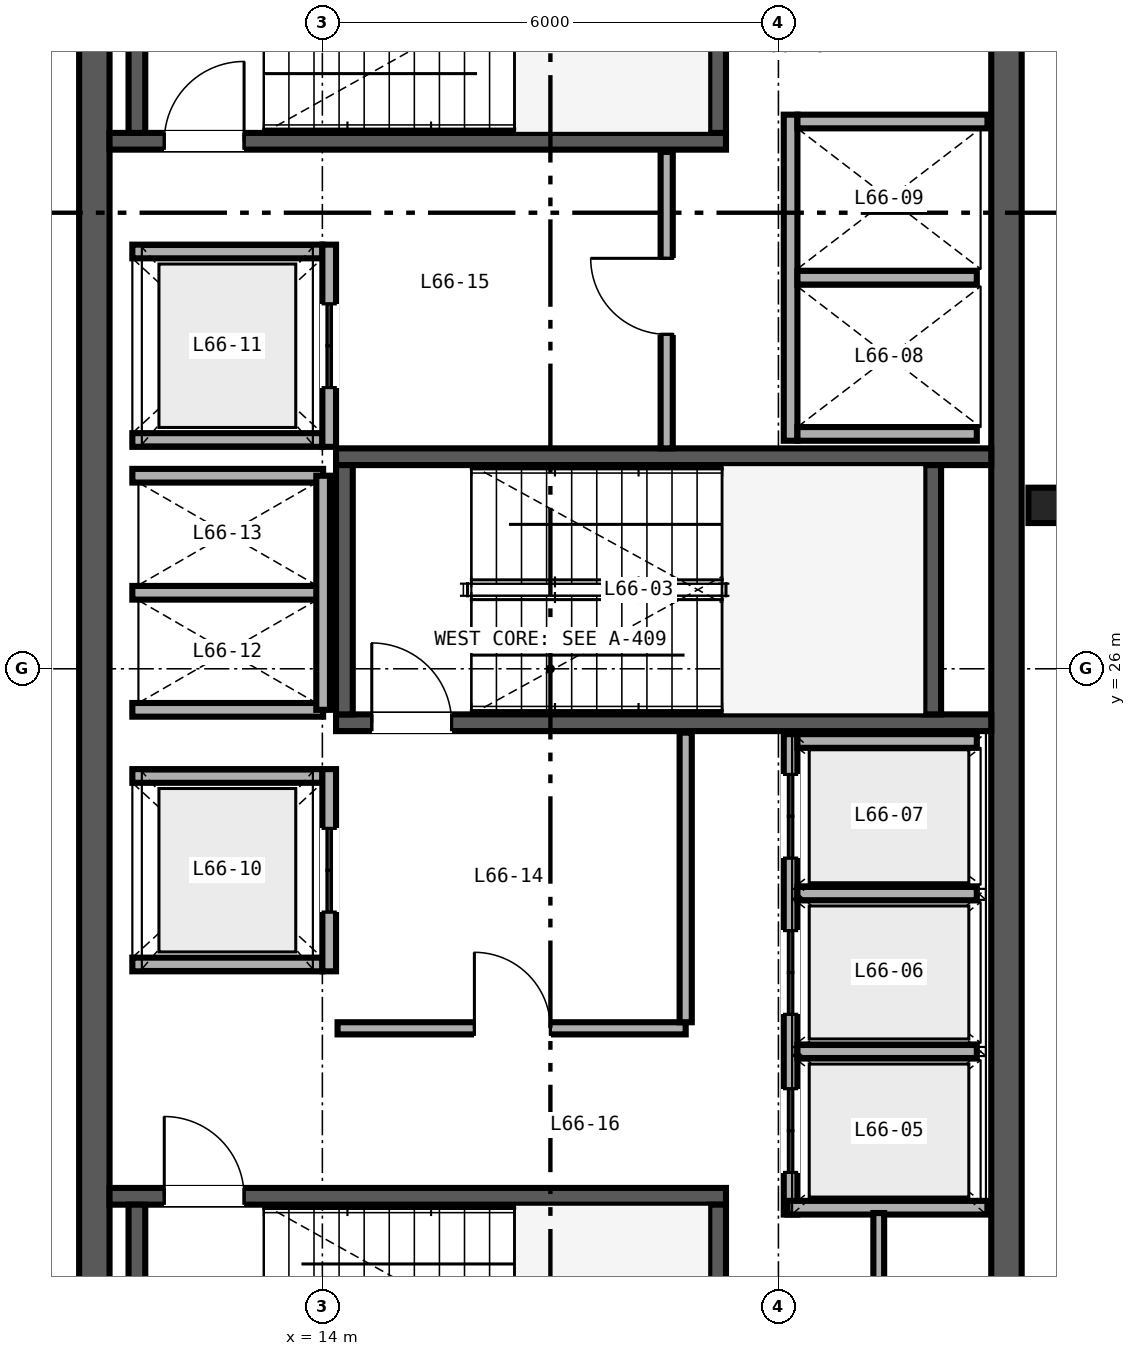
"""IFC4 building model, lengths in metres.
Left out: names, types, materials, properties, quantities, classifications, styles, units other than length and angle.
Written with IfcOpenShell. Run it as: python <this file> out.ifc"""

import sys

from ifc_helpers import new_model, si_unit, direction, frame, frame_2d, origin, origin_2d, place, context, subcontext, project, spatial, rectangle, i_section, extrude, source, transform, mapped, element, fill, save


model = new_model("IFC4")
c1 = context("Model", 3, precision=1e-05, world=origin(), true_north=direction((0.0, 1.0)))
c2 = subcontext(c1, "Body", "Model", "MODEL_VIEW")
j1 = project(units=[si_unit("LENGTHUNIT", "METRE"), si_unit("PLANEANGLEUNIT", "RADIAN")], contexts=[c1])
p1 = place(None, origin())
s1 = spatial("IfcSite", under=j1, at=p1, CompositionType="ELEMENT")
p2 = place(p1, origin())
s2 = spatial("IfcBuilding", under=s1, at=p2, CompositionType="ELEMENT")
p3 = place(p2, frame((0.0, 0.0, 261.6)))
s3 = spatial("IfcBuildingStorey", under=s2, at=p3, CompositionType="ELEMENT", Elevation=261.6)
for number, where, z_axis, x_axis in (
    (1, (11.0, 15.2, 0.0), (0.0, 0.0, 1.0), (0.0, 1.0, 0.0)),
    (2, (23.0, 15.2, 0.0), (0.0, 0.0, 1.0), (0.0, 1.0, 0.0)),
):
    element("IfcWall", number, at=place(p3, frame(where, z_axis=z_axis, x_axis=x_axis)), inside=s3, PredefinedType="SHEAR", context=c2, shape_type="SweptSolid", body=[
        extrude(rectangle(XDim=21.6, YDim=0.4, at=frame_2d((10.8, 0.0))), origin(), (0.0, 0.0, 1.0), 3.38),
    ])
p4 = place(p3, frame((11.2, 19.06, 0.0), z_axis=(0.0, 0.0, 1.0), x_axis=(1.0, 0.0, 0.0)))
e3 = element("IfcWall", 3, at=p4, inside=s3, PredefinedType="SHEAR", context=c2, shape_type="SweptSolid", body=[
    extrude(rectangle(XDim=8.11, YDim=0.22, at=frame_2d((4.055, 0.0))), origin(), (0.0, 0.0, 1.0), 3.4),
])
p5 = place(p4, frame((0.72, 0.0, 0.0)))
e4 = element("IfcOpeningElement", 4, at=p5, cuts=e3, PredefinedType="OPENING", context=c2, shape_type="SweptSolid", body=[
    extrude(rectangle(XDim=1.05, YDim=2.15, at=frame_2d((0.525, 1.075))), frame((0.0, 0.12, 0.0), z_axis=(0.0, -1.0, 0.0), x_axis=(1.0, 0.0, 0.0)), (0.0, 0.0, 1.0), 0.24),
])
for number, where, z_axis, x_axis in (
    (5, (11.56, 15.67, 0.0), (0.0, 0.0, 1.0), (0.0, 1.0, 0.0)),
    (6, (19.2, 15.67, 0.0), (0.0, 0.0, 1.0), (0.0, 1.0, 0.0)),
):
    element("IfcWall", number, at=place(p3, frame(where, z_axis=z_axis, x_axis=x_axis)), inside=s3, PredefinedType="SHEAR", context=c2, shape_type="SweptSolid", body=[
        extrude(rectangle(XDim=3.28, YDim=0.22, at=frame_2d((1.64, 0.0))), origin(), (0.0, 0.0, 1.0), 3.4),
    ])
p6 = place(p3, frame((11.2, 32.94, 0.0), z_axis=(0.0, 0.0, 1.0), x_axis=(1.0, 0.0, 0.0)))
e7 = element("IfcWall", 7, at=p6, inside=s3, PredefinedType="SHEAR", context=c2, shape_type="SweptSolid", body=[
    extrude(rectangle(XDim=8.11, YDim=0.22, at=frame_2d((4.055, 0.0))), origin(), (0.0, 0.0, 1.0), 3.4),
])
p7 = place(p6, frame((0.72, 0.0, 0.0)))
e8 = element("IfcOpeningElement", 8, at=p7, cuts=e7, PredefinedType="OPENING", context=c2, shape_type="SweptSolid", body=[
    extrude(rectangle(XDim=1.05, YDim=2.15, at=frame_2d((0.525, 1.075))), frame((0.0, 0.12, 0.0), z_axis=(0.0, -1.0, 0.0), x_axis=(1.0, 0.0, 0.0)), (0.0, 0.0, 1.0), 0.24),
])
for number, where, z_axis, x_axis in (
    (9, (11.56, 33.05, 0.0), (0.0, 0.0, 1.0), (0.0, 1.0, 0.0)),
    (10, (19.2, 33.05, 0.0), (0.0, 0.0, 1.0), (0.0, 1.0, 0.0)),
):
    element("IfcWall", number, at=place(p3, frame(where, z_axis=z_axis, x_axis=x_axis)), inside=s3, PredefinedType="SHEAR", context=c2, shape_type="SweptSolid", body=[
        extrude(rectangle(XDim=3.28, YDim=0.22, at=frame_2d((1.64, 0.0))), origin(), (0.0, 0.0, 1.0), 3.4),
    ])
p8 = place(p3, frame((14.18, 25.29, 0.0), z_axis=(0.0, 0.0, 1.0), x_axis=(1.0, 0.0, 0.0)))
e11 = element("IfcWall", 11, at=p8, inside=s3, PredefinedType="SHEAR", context=c2, shape_type="SweptSolid", body=[
    extrude(rectangle(XDim=8.62, YDim=0.22, at=frame_2d((4.31, 0.0))), origin(), (0.0, 0.0, 1.0), 3.4),
])
p9 = place(p8, frame((0.47, 0.0, 0.0)))
e12 = element("IfcOpeningElement", 12, at=p9, cuts=e11, PredefinedType="OPENING", context=c2, shape_type="SweptSolid", body=[
    extrude(rectangle(XDim=1.05, YDim=2.15, at=frame_2d((0.525, 1.075))), frame((0.0, 0.12, 0.0), z_axis=(0.0, -1.0, 0.0), x_axis=(1.0, 0.0, 0.0)), (0.0, 0.0, 1.0), 0.24),
])
p10 = place(p3, frame((14.18, 28.79, 0.0), z_axis=(0.0, 0.0, 1.0), x_axis=(1.0, 0.0, 0.0)))
e13 = element("IfcWall", 13, at=p10, inside=s3, PredefinedType="SHEAR", context=c2, shape_type="SweptSolid", body=[
    extrude(rectangle(XDim=8.62, YDim=0.22, at=frame_2d((4.31, 0.0))), origin(), (0.0, 0.0, 1.0), 3.4),
])
for number, where, z_axis, x_axis in (
    (14, (14.29, 25.4, 0.0), (0.0, 0.0, 1.0), (0.0, 1.0, 0.0)),
    (15, (22.03, 25.4, 0.0), (0.0, 0.0, 1.0), (0.0, 1.0, 0.0)),
):
    element("IfcWall", number, at=place(p3, frame(where, z_axis=z_axis, x_axis=x_axis)), inside=s3, PredefinedType="SHEAR", context=c2, shape_type="SweptSolid", body=[
        extrude(rectangle(XDim=3.28, YDim=0.22, at=frame_2d((1.64, 0.0))), origin(), (0.0, 0.0, 1.0), 3.4),
    ])
m1 = source(origin(), c2, "Body", "SweptSolid", [
    extrude(i_section(OverallWidth=0.422, OverallDepth=0.465, WebThickness=0.045, FlangeThickness=0.073, FilletRadius=0.025, at=origin_2d()), origin(), (0.0, 0.0, 1.0), 3.38),
])
p11 = place(p3, frame((23.5, 28.15, 0.0), z_axis=(0.0, 0.0, 1.0), x_axis=(1.0, 0.0, 0.0)))
e16 = element("IfcColumn", 16, at=p11, inside=s3, PredefinedType="COLUMN", context=c2, shape_type="MappedRepresentation", body=[
    mapped(m1, transform((0.0, 0.0, 0.0), scale=1.0)),
])
p12 = place(p3, frame((20.16, 18.82, 0.0), z_axis=(0.0, 0.0, 1.0), x_axis=(0.0, 1.0, 0.0)))
e17 = element("IfcWall", 17, at=p12, inside=s3, PredefinedType="SOLIDWALL", context=c2, shape_type="SweptSolid", body=[
    extrude(rectangle(XDim=6.32, YDim=0.18, at=frame_2d((3.16, 0.0))), origin(), (0.0, 0.0, 1.0), 2.48),
])
p13 = place(p12, frame((0.555, 0.0, 0.0)))
e18 = element("IfcOpeningElement", 18, at=p13, cuts=e17, PredefinedType="OPENING", context=c2, shape_type="SweptSolid", body=[
    extrude(rectangle(XDim=1.1, YDim=2.2, at=frame_2d((0.55, 1.1))), frame((0.0, 0.1, 0.0), z_axis=(0.0, -1.0, 0.0), x_axis=(1.0, 0.0, 0.0)), (0.0, 0.0, 1.0), 0.2),
])
p14 = place(p12, frame((2.635, 0.0, 0.0)))
e19 = element("IfcOpeningElement", 19, at=p14, cuts=e17, PredefinedType="OPENING", context=c2, shape_type="SweptSolid", body=[
    extrude(rectangle(XDim=1.1, YDim=2.2, at=frame_2d((0.55, 1.1))), frame((0.0, 0.1, 0.0), z_axis=(0.0, -1.0, 0.0), x_axis=(1.0, 0.0, 0.0)), (0.0, 0.0, 1.0), 0.2),
])
p15 = place(p12, frame((4.69, 0.0, 0.0)))
e20 = element("IfcOpeningElement", 20, at=p15, cuts=e17, PredefinedType="OPENING", context=c2, shape_type="SweptSolid", body=[
    extrude(rectangle(XDim=1.1, YDim=2.2, at=frame_2d((0.55, 1.1))), frame((0.0, 0.1, 0.0), z_axis=(0.0, -1.0, 0.0), x_axis=(1.0, 0.0, 0.0)), (0.0, 0.0, 1.0), 0.2),
])
p16 = place(p3, frame((20.12, 18.91, 0.0), z_axis=(0.0, 0.0, 1.0), x_axis=(1.0, 0.0, 0.0)))
e21 = element("IfcWall", 21, at=p16, inside=s3, PredefinedType="SOLIDWALL", context=c2, shape_type="SweptSolid", body=[
    extrude(rectangle(XDim=2.63, YDim=0.18, at=frame_2d((1.315, 0.0))), origin(), (0.0, 0.0, 1.0), 3.38),
])
p17 = place(p3, frame((20.25, 25.05, 0.0), z_axis=(0.0, 0.0, 1.0), x_axis=(1.0, 0.0, 0.0)))
e22 = element("IfcWall", 22, at=p17, inside=s3, PredefinedType="SOLIDWALL", context=c2, shape_type="SweptSolid", body=[
    extrude(rectangle(XDim=2.36, YDim=0.18, at=frame_2d((1.18, 0.0))), origin(), (0.0, 0.0, 1.0), 3.38),
])
p18 = place(p3, frame((20.25, 20.965, 0.0), z_axis=(0.0, 0.0, 1.0), x_axis=(1.0, 0.0, 0.0)))
e23 = element("IfcWall", 23, at=p18, inside=s3, PredefinedType="SOLIDWALL", context=c2, shape_type="SweptSolid", body=[
    extrude(rectangle(XDim=2.36, YDim=0.18, at=frame_2d((1.18, 0.0))), origin(), (0.0, 0.0, 1.0), 2.48),
])
p19 = place(p3, frame((20.25, 23.045, 0.0), z_axis=(0.0, 0.0, 1.0), x_axis=(1.0, 0.0, 0.0)))
e24 = element("IfcWall", 24, at=p19, inside=s3, PredefinedType="SOLIDWALL", context=c2, shape_type="SweptSolid", body=[
    extrude(rectangle(XDim=2.36, YDim=0.18, at=frame_2d((1.18, 0.0))), origin(), (0.0, 0.0, 1.0), 3.38),
])
p20 = place(p3, frame((20.16, 29.0, 0.0), z_axis=(0.0, 0.0, 1.0), x_axis=(0.0, 1.0, 0.0)))
e25 = element("IfcWall", 25, at=p20, inside=s3, PredefinedType="SOLIDWALL", context=c2, shape_type="SweptSolid", body=[
    extrude(rectangle(XDim=4.29, YDim=0.18, at=frame_2d((2.145, 0.0))), origin(), (0.0, 0.0, 1.0), 3.38),
])
p21 = place(p3, frame((20.25, 29.09, 0.0), z_axis=(0.0, 0.0, 1.0), x_axis=(1.0, 0.0, 0.0)))
e26 = element("IfcWall", 26, at=p21, inside=s3, PredefinedType="SOLIDWALL", context=c2, shape_type="SweptSolid", body=[
    extrude(rectangle(XDim=2.36, YDim=0.18, at=frame_2d((1.18, 0.0))), origin(), (0.0, 0.0, 1.0), 3.38),
])
p22 = place(p3, frame((20.25, 33.2, 0.0), z_axis=(0.0, 0.0, 1.0), x_axis=(1.0, 0.0, 0.0)))
e27 = element("IfcWall", 27, at=p22, inside=s3, PredefinedType="SOLIDWALL", context=c2, shape_type="SweptSolid", body=[
    extrude(rectangle(XDim=2.5, YDim=0.18, at=frame_2d((1.25, 0.0))), origin(), (0.0, 0.0, 1.0), 3.38),
])
p23 = place(p3, frame((20.25, 31.145, 0.0), z_axis=(0.0, 0.0, 1.0), x_axis=(1.0, 0.0, 0.0)))
e28 = element("IfcWall", 28, at=p23, inside=s3, PredefinedType="SOLIDWALL", context=c2, shape_type="SweptSolid", body=[
    extrude(rectangle(XDim=2.36, YDim=0.18, at=frame_2d((1.18, 0.0))), origin(), (0.0, 0.0, 1.0), 3.38),
])
for number, where, z_axis, x_axis in (
    (29, (11.5, 22.11, 0.0), (0.0, 0.0, 1.0), (1.0, 0.0, 0.0)),
    (30, (11.5, 24.59, 0.0), (0.0, 0.0, 1.0), (1.0, 0.0, 0.0)),
):
    element("IfcWall", number, at=place(p3, frame(where, z_axis=z_axis, x_axis=x_axis)), inside=s3, PredefinedType="SOLIDWALL", context=c2, shape_type="SweptSolid", body=[
        extrude(rectangle(XDim=2.5, YDim=0.18, at=frame_2d((1.25, 0.0))), origin(), (0.0, 0.0, 1.0), 3.38),
    ])
p24 = place(p3, frame((14.09, 22.02, 0.0), z_axis=(0.0, 0.0, 1.0), x_axis=(0.0, 1.0, 0.0)))
e31 = element("IfcWall", 31, at=p24, inside=s3, PredefinedType="SOLIDWALL", context=c2, shape_type="SweptSolid", body=[
    extrude(rectangle(XDim=2.66, YDim=0.18, at=frame_2d((1.33, 0.0))), origin(), (0.0, 0.0, 1.0), 3.38),
])
p25 = place(p24, frame((0.78, 0.0, 0.0)))
e32 = element("IfcOpeningElement", 32, at=p25, cuts=e31, PredefinedType="OPENING", context=c2, shape_type="SweptSolid", body=[
    extrude(rectangle(XDim=1.1, YDim=2.2, at=frame_2d((0.55, 1.1))), frame((0.0, 0.1, 0.0), z_axis=(0.0, -1.0, 0.0), x_axis=(1.0, 0.0, 0.0)), (0.0, 0.0, 1.0), 0.2),
])
for number, where, z_axis, x_axis in (
    (33, (11.5, 29.01, 0.0), (0.0, 0.0, 1.0), (1.0, 0.0, 0.0)),
    (34, (11.5, 31.49, 0.0), (0.0, 0.0, 1.0), (1.0, 0.0, 0.0)),
):
    element("IfcWall", number, at=place(p3, frame(where, z_axis=z_axis, x_axis=x_axis)), inside=s3, PredefinedType="SOLIDWALL", context=c2, shape_type="SweptSolid", body=[
        extrude(rectangle(XDim=2.5, YDim=0.18, at=frame_2d((1.25, 0.0))), origin(), (0.0, 0.0, 1.0), 3.38),
    ])
p26 = place(p3, frame((14.09, 28.92, 0.0), z_axis=(0.0, 0.0, 1.0), x_axis=(0.0, 1.0, 0.0)))
e35 = element("IfcWall", 35, at=p26, inside=s3, PredefinedType="SOLIDWALL", context=c2, shape_type="SweptSolid", body=[
    extrude(rectangle(XDim=2.66, YDim=0.18, at=frame_2d((1.33, 0.0))), origin(), (0.0, 0.0, 1.0), 3.38),
])
p27 = place(p26, frame((0.78, 0.0, 0.0)))
e36 = element("IfcOpeningElement", 36, at=p27, cuts=e35, PredefinedType="OPENING", context=c2, shape_type="SweptSolid", body=[
    extrude(rectangle(XDim=1.1, YDim=2.2, at=frame_2d((0.55, 1.1))), frame((0.0, 0.1, 0.0), z_axis=(0.0, -1.0, 0.0), x_axis=(1.0, 0.0, 0.0)), (0.0, 0.0, 1.0), 0.2),
])
for number, where, z_axis, x_axis in (
    (37, (11.5, 25.46, 0.0), (0.0, 0.0, 1.0), (1.0, 0.0, 0.0)),
    (38, (11.5, 27.0, 0.0), (0.0, 0.0, 1.0), (1.0, 0.0, 0.0)),
    (39, (11.5, 28.54, 0.0), (0.0, 0.0, 1.0), (1.0, 0.0, 0.0)),
):
    element("IfcWall", number, at=place(p3, frame(where, z_axis=z_axis, x_axis=x_axis)), inside=s3, PredefinedType="SOLIDWALL", context=c2, shape_type="SweptSolid", body=[
        extrude(rectangle(XDim=2.51, YDim=0.18, at=frame_2d((1.255, 0.0))), origin(), (0.0, 0.0, 1.0), 3.38),
    ])
p28 = place(p3, frame((14.01, 25.46, 0.0), z_axis=(0.0, 0.0, 1.0), x_axis=(0.0, 1.0, 0.0)))
e40 = element("IfcWall", 40, at=p28, inside=s3, PredefinedType="SOLIDWALL", context=c2, shape_type="SweptSolid", body=[
    extrude(rectangle(XDim=3.08, YDim=0.18, at=frame_2d((1.54, 0.0))), origin(), (0.0, 0.0, 1.0), 3.38),
])
p29 = place(p3, frame((14.2, 21.27, 0.0), z_axis=(0.0, 0.0, 1.0), x_axis=(1.0, 0.0, 0.0)))
e41 = element("IfcWall", 41, at=p29, inside=s3, PredefinedType="PARTITIONING", context=c2, shape_type="SweptSolid", body=[
    extrude(rectangle(XDim=4.58, YDim=0.16, at=frame_2d((2.29, 0.0))), origin(), (0.0, 0.0, 1.0), 3.38),
])
p30 = place(p29, frame((1.8, 0.0, 0.0)))
e42 = element("IfcOpeningElement", 42, at=p30, cuts=e41, PredefinedType="OPENING", context=c2, shape_type="SweptSolid", body=[
    extrude(rectangle(XDim=1.0, YDim=2.15, at=frame_2d((0.5, 1.075))), frame((0.0, 0.09, 0.0), z_axis=(0.0, -1.0, 0.0), x_axis=(1.0, 0.0, 0.0)), (0.0, 0.0, 1.0), 0.18),
])
p31 = place(p3, frame((18.78, 21.35, 0.0), z_axis=(0.0, 0.0, 1.0), x_axis=(0.0, 1.0, 0.0)))
e43 = element("IfcWall", 43, at=p31, inside=s3, PredefinedType="PARTITIONING", context=c2, shape_type="SweptSolid", body=[
    extrude(rectangle(XDim=3.81, YDim=0.16, at=frame_2d((1.905, 0.0))), origin(), (0.0, 0.0, 1.0), 3.38),
])
p32 = place(p3, frame((18.53, 28.9, 0.0), z_axis=(0.0, 0.0, 1.0), x_axis=(0.0, 1.0, 0.0)))
e44 = element("IfcWall", 44, at=p32, inside=s3, PredefinedType="PARTITIONING", context=c2, shape_type="SweptSolid", body=[
    extrude(rectangle(XDim=3.9, YDim=0.16, at=frame_2d((1.95, 0.0))), origin(), (0.0, 0.0, 1.0), 3.38),
])
p33 = place(p32, frame((1.5, 0.0, 0.0)))
e45 = element("IfcOpeningElement", 45, at=p33, cuts=e44, PredefinedType="OPENING", context=c2, shape_type="SweptSolid", body=[
    extrude(rectangle(XDim=1.0, YDim=2.15, at=frame_2d((0.5, 1.075))), frame((0.0, 0.09, 0.0), z_axis=(0.0, -1.0, 0.0), x_axis=(1.0, 0.0, 0.0)), (0.0, 0.0, 1.0), 0.18),
])
p34 = place(p3, frame((21.32, 15.25, 0.0), z_axis=(0.0, 0.0, 1.0), x_axis=(0.0, 1.0, 0.0)))
e46 = element("IfcWall", 46, at=p34, inside=s3, PredefinedType="PARTITIONING", context=c2, shape_type="SweptSolid", body=[
    extrude(rectangle(XDim=3.59, YDim=0.142, at=frame_2d((1.795, 0.0))), origin(), (0.0, 0.0, 1.0), 3.38),
])
p35 = place(p34, frame((1.25, 0.0, 0.0)))
e47 = element("IfcOpeningElement", 47, at=p35, cuts=e46, PredefinedType="OPENING", context=c2, shape_type="SweptSolid", body=[
    extrude(rectangle(XDim=0.84, YDim=2.1, at=frame_2d((0.42, 1.05))), frame((0.0, 0.081, 0.0), z_axis=(0.0, -1.0, 0.0), x_axis=(1.0, 0.0, 0.0)), (0.0, 0.0, 1.0), 0.162),
])
m2 = source(origin(), c2, "Body", "SweptSolid", [
    extrude(rectangle(XDim=1.05, YDim=2.15, at=frame_2d((0.525, 1.075))), frame((0.0, 0.025, 0.0), z_axis=(0.0, -1.0, 0.0), x_axis=(1.0, 0.0, 0.0)), (0.0, 0.0, 1.0), 0.05),
])
p36 = place(p5, origin())
e48 = element("IfcDoor", 48, at=p36, inside=s3, OperationType="SINGLE_SWING_LEFT", PredefinedType="DOOR", context=c2, shape_type="MappedRepresentation", body=[
    mapped(m2, transform((0.0, 0.0, 0.0), scale=1.0)),
])
fill(e4, e48)
p37 = place(p7, origin())
e49 = element("IfcDoor", 49, at=p37, inside=s3, OperationType="SINGLE_SWING_RIGHT", PredefinedType="DOOR", context=c2, shape_type="MappedRepresentation", body=[
    mapped(m2, transform((0.0, 0.0, 0.0), scale=1.0)),
])
fill(e8, e49)
p38 = place(p9, origin())
e50 = element("IfcDoor", 50, at=p38, inside=s3, OperationType="SINGLE_SWING_LEFT", PredefinedType="DOOR", context=c2, shape_type="MappedRepresentation", body=[
    mapped(m2, transform((0.0, 0.0, 0.0), scale=1.0)),
])
fill(e12, e50)
m3 = source(origin(), c2, "Body", "SweptSolid", [
    extrude(rectangle(XDim=1.1, YDim=2.2, at=frame_2d((0.55, 1.1))), frame((0.0, 0.025, 0.0), z_axis=(0.0, -1.0, 0.0), x_axis=(1.0, 0.0, 0.0)), (0.0, 0.0, 1.0), 0.05),
])
p39 = place(p13, origin())
e51 = element("IfcDoor", 51, at=p39, inside=s3, OperationType="DOUBLE_DOOR_SLIDING", PredefinedType="DOOR", context=c2, shape_type="MappedRepresentation", body=[
    mapped(m3, transform((0.0, 0.0, 0.0), scale=1.0)),
])
fill(e18, e51)
p40 = place(p14, origin())
e52 = element("IfcDoor", 52, at=p40, inside=s3, OperationType="DOUBLE_DOOR_SLIDING", PredefinedType="DOOR", context=c2, shape_type="MappedRepresentation", body=[
    mapped(m3, transform((0.0, 0.0, 0.0), scale=1.0)),
])
fill(e19, e52)
p41 = place(p15, origin())
e53 = element("IfcDoor", 53, at=p41, inside=s3, OperationType="DOUBLE_DOOR_SLIDING", PredefinedType="DOOR", context=c2, shape_type="MappedRepresentation", body=[
    mapped(m3, transform((0.0, 0.0, 0.0), scale=1.0)),
])
fill(e20, e53)
p42 = place(p25, origin())
e54 = element("IfcDoor", 54, at=p42, inside=s3, OperationType="DOUBLE_DOOR_SLIDING", PredefinedType="DOOR", context=c2, shape_type="MappedRepresentation", body=[
    mapped(m3, transform((0.0, 0.0, 0.0), scale=1.0)),
])
fill(e32, e54)
p43 = place(p27, origin())
e55 = element("IfcDoor", 55, at=p43, inside=s3, OperationType="DOUBLE_DOOR_SLIDING", PredefinedType="DOOR", context=c2, shape_type="MappedRepresentation", body=[
    mapped(m3, transform((0.0, 0.0, 0.0), scale=1.0)),
])
fill(e36, e55)
m4 = source(origin(), c2, "Body", "SweptSolid", [
    extrude(rectangle(XDim=1.0, YDim=2.15, at=frame_2d((0.5, 1.075))), frame((0.0, 0.025, 0.0), z_axis=(0.0, -1.0, 0.0), x_axis=(1.0, 0.0, 0.0)), (0.0, 0.0, 1.0), 0.05),
])
p44 = place(p30, origin())
e56 = element("IfcDoor", 56, at=p44, inside=s3, OperationType="SINGLE_SWING_LEFT", PredefinedType="DOOR", context=c2, shape_type="MappedRepresentation", body=[
    mapped(m4, transform((0.0, 0.0, 0.0), scale=1.0)),
])
fill(e42, e56)
p45 = place(p33, origin())
e57 = element("IfcDoor", 57, at=p45, inside=s3, OperationType="SINGLE_SWING_RIGHT", PredefinedType="DOOR", context=c2, shape_type="MappedRepresentation", body=[
    mapped(m4, transform((0.0, 0.0, 0.0), scale=1.0)),
])
fill(e45, e57)
save(model, sys.argv[1])
